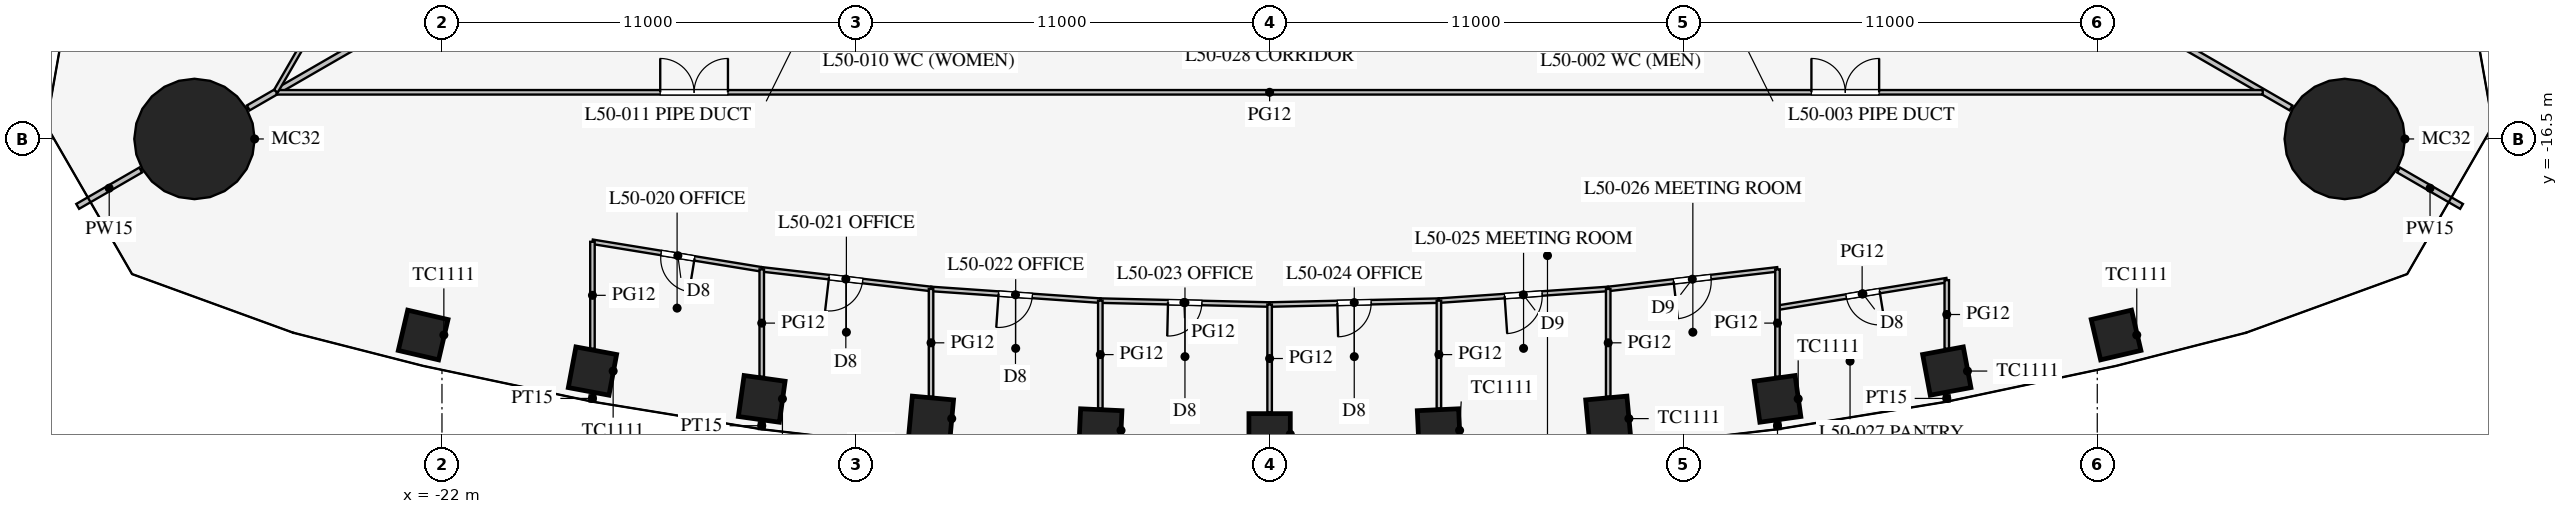
"""IFC4 building model, lengths in metres.
Left out: names, types, materials, properties, quantities, classifications, styles, units other than length and angle.
Written with IfcOpenShell. Run it as: python <this file> out.ifc"""

import sys

from ifc_helpers import new_model, si_unit, direction, frame, frame_2d, origin, origin_2d, place, context, subcontext, project, spatial, rectangle, circle, extrude, element, fill, save


model = new_model("IFC4")
c1 = context("Model", 3, precision=1e-05, world=origin(), true_north=direction((0.0, 1.0)))
c2 = subcontext(c1, "Body", "Model", "MODEL_VIEW")
j1 = project(units=[si_unit("LENGTHUNIT", "METRE"), si_unit("PLANEANGLEUNIT", "RADIAN")], contexts=[c1])
p1 = place(None, origin())
s1 = spatial("IfcSite", under=j1, at=p1, CompositionType="ELEMENT")
p2 = place(p1, origin())
s2 = spatial("IfcBuilding", under=s1, at=p2, CompositionType="ELEMENT")
p3 = place(p2, frame((0.0, 0.0, 219.1)))
s3 = spatial("IfcBuildingStorey", under=s2, at=p3, CompositionType="ELEMENT", Elevation=219.1)
for number, where, z_axis, x_axis in (
    (1, (-22.5, -21.71, 0.0), (0.0, 0.0, 1.0), (0.974, -0.227, 0.0)),
    (2, (-18.0, -22.669, 0.0), (0.0, 0.0, 1.0), (0.983, -0.184, 0.0)),
    (3, (-13.5, -23.408, 0.0), (0.0, 0.0, 1.0), (0.99, -0.138, 0.0)),
    (4, (-9.0, -23.933, 0.0), (0.0, 0.0, 1.0), (0.996, -0.092, 0.0)),
    (5, (-4.5, -24.246, 0.0), (0.0, 0.0, 1.0), (0.999, -0.046, 0.0)),
    (6, (0.0, -24.351, 0.0), (0.0, 0.0, 1.0), (1.0, 0.0, 0.0)),
    (7, (4.5, -24.246, 0.0), (0.0, 0.0, 1.0), (0.999, 0.046, 0.0)),
    (8, (9.0, -23.933, 0.0), (0.0, 0.0, 1.0), (0.996, 0.092, 0.0)),
    (9, (13.5, -23.408, 0.0), (0.0, 0.0, 1.0), (0.99, 0.138, 0.0)),
    (10, (18.0, -22.669, 0.0), (0.0, 0.0, 1.0), (0.983, 0.184, 0.0)),
    (11, (22.5, -21.71, 0.0), (0.0, 0.0, 1.0), (0.974, 0.227, 0.0)),
):
    element("IfcColumn", number, at=place(p3, frame(where, z_axis=z_axis, x_axis=x_axis)), inside=s3, PredefinedType="COLUMN", context=c2, shape_type="SweptSolid", body=[
        extrude(rectangle(XDim=1.1, YDim=1.1, at=origin_2d()), origin(), (0.0, 0.0, 1.0), 4.2),
    ])
for number, where, z_axis, x_axis in (
    (12, (28.579, -16.5, 0.0), (0.0, 0.0, 1.0), (1.0, 0.0, 0.0)),
    (13, (-28.579, -16.5, 0.0), (0.0, 0.0, 1.0), (1.0, 0.0, 0.0)),
):
    element("IfcColumn", number, at=place(p3, frame(where, z_axis=z_axis, x_axis=x_axis)), inside=s3, PredefinedType="COLUMN", context=c2, shape_type="SweptSolid", body=[
        extrude(circle(Radius=1.6, at=origin_2d()), origin(), (0.0, 0.0, 1.0), 4.2),
    ])
p4 = place(p3, frame((14.203, -8.2, 0.0), z_axis=(0.0, 0.0, 1.0), x_axis=(0.866021600284, -0.500006587798, 0.0)))
e14 = element("IfcWall", 14, at=p4, inside=s3, PredefinedType="PARTITIONING", context=c2, shape_type="SweptSolid", body=[
    extrude(rectangle(XDim=14.95, YDim=0.15, at=frame_2d((7.475, 0.0))), origin(), (0.0, 0.0, 1.0), 2.4),
])
p5 = place(p3, frame((30.008, -17.325, 0.0), z_axis=(0.0, 0.0, 1.0), x_axis=(0.866013246922, -0.500021055713, 0.0)))
e15 = element("IfcWall", 15, at=p5, inside=s3, PredefinedType="PARTITIONING", context=c2, shape_type="SweptSolid", body=[
    extrude(rectangle(XDim=1.935, YDim=0.15, at=frame_2d((0.967, 0.0))), origin(), (0.0, 0.0, 1.0), 2.4),
])
p6 = place(p3, frame((-14.203, -8.2, 0.0), z_axis=(0.0, 0.0, 1.0), x_axis=(-0.866021600284, -0.500006587798, 0.0)))
e16 = element("IfcWall", 16, at=p6, inside=s3, PredefinedType="PARTITIONING", context=c2, shape_type="SweptSolid", body=[
    extrude(rectangle(XDim=14.95, YDim=0.15, at=frame_2d((7.475, 0.0))), origin(), (0.0, 0.0, 1.0), 2.4),
])
p7 = place(p3, frame((-30.008, -17.325, 0.0), z_axis=(0.0, 0.0, 1.0), x_axis=(-0.866013246922, -0.500021055713, 0.0)))
e17 = element("IfcWall", 17, at=p7, inside=s3, PredefinedType="PARTITIONING", context=c2, shape_type="SweptSolid", body=[
    extrude(rectangle(XDim=1.935, YDim=0.15, at=frame_2d((0.967, 0.0))), origin(), (0.0, 0.0, 1.0), 2.4),
])
p8 = place(p3, frame((-26.398, -15.26, 0.0), z_axis=(0.0, 0.0, 1.0), x_axis=(1.0, 0.0, 0.0)))
e18 = element("IfcWall", 18, at=p8, inside=s3, PredefinedType="PARTITIONING", context=c2, shape_type="SweptSolid", body=[
    extrude(rectangle(XDim=52.796, YDim=0.12, at=frame_2d((26.398, 0.0))), origin(), (0.0, 0.0, 1.0), 2.9),
])
p9 = place(p8, frame((10.2, 0.0, 0.15)))
e19 = element("IfcOpeningElement", 19, at=p9, cuts=e18, PredefinedType="OPENING", context=c2, shape_type="SweptSolid", body=[
    extrude(rectangle(XDim=1.8, YDim=2.1, at=frame_2d((0.9, 1.05))), frame((0.0, 0.07, 0.0), z_axis=(0.0, -1.0, 0.0), x_axis=(1.0, 0.0, 0.0)), (0.0, 0.0, 1.0), 0.14),
])
p10 = place(p8, frame((40.8, 0.0, 0.15)))
e20 = element("IfcOpeningElement", 20, at=p10, cuts=e18, PredefinedType="OPENING", context=c2, shape_type="SweptSolid", body=[
    extrude(rectangle(XDim=1.8, YDim=2.1, at=frame_2d((0.9, 1.05))), frame((0.0, 0.07, 0.0), z_axis=(0.0, -1.0, 0.0), x_axis=(1.0, 0.0, 0.0)), (0.0, 0.0, 1.0), 0.14),
])
p11 = place(p3, frame((13.5, -24.033, 0.0), z_axis=(0.0, 0.0, 1.0), x_axis=(0.0, -1.0, 0.0)))
e21 = element("IfcWall", 21, at=p11, inside=s3, PredefinedType="PARTITIONING", context=c2, shape_type="SweptSolid", body=[
    extrude(rectangle(XDim=0.178, YDim=0.15, at=frame_2d((0.089, 0.0))), origin(), (0.0, 0.0, 1.0), 2.9),
])
p12 = place(p3, frame((18.0, -23.315, 0.0), z_axis=(0.0, 0.0, 1.0), x_axis=(0.0, -1.0, 0.0)))
e22 = element("IfcWall", 22, at=p12, inside=s3, PredefinedType="PARTITIONING", context=c2, shape_type="SweptSolid", body=[
    extrude(rectangle(XDim=0.163, YDim=0.15, at=frame_2d((0.082, 0.0))), origin(), (0.0, 0.0, 1.0), 2.9),
])
p13 = place(p3, frame((-13.5, -24.033, 0.0), z_axis=(0.0, 0.0, 1.0), x_axis=(0.0, -1.0, 0.0)))
e23 = element("IfcWall", 23, at=p13, inside=s3, PredefinedType="PARTITIONING", context=c2, shape_type="SweptSolid", body=[
    extrude(rectangle(XDim=0.178, YDim=0.15, at=frame_2d((0.089, 0.0))), origin(), (0.0, 0.0, 1.0), 2.9),
])
p14 = place(p3, frame((-18.0, -23.315, 0.0), z_axis=(0.0, 0.0, 1.0), x_axis=(0.0, -1.0, 0.0)))
e24 = element("IfcWall", 24, at=p14, inside=s3, PredefinedType="PARTITIONING", context=c2, shape_type="SweptSolid", body=[
    extrude(rectangle(XDim=0.163, YDim=0.15, at=frame_2d((0.082, 0.0))), origin(), (0.0, 0.0, 1.0), 2.9),
])
p15 = place(p3, frame((0.0, -20.901, 0.0), z_axis=(0.0, 0.0, 1.0), x_axis=(0.99973552509, 0.022997388381, 0.0)))
e25 = element("IfcWall", 25, at=p15, inside=s3, PredefinedType="PARTITIONING", context=c2, shape_type="SweptSolid", body=[
    extrude(rectangle(XDim=4.501, YDim=0.12, at=frame_2d((2.25, 0.0))), origin(), (0.0, 0.0, 1.0), 2.9),
])
p16 = place(p15, frame((1.8, 0.0, 0.15)))
e26 = element("IfcOpeningElement", 26, at=p16, cuts=e25, PredefinedType="OPENING", context=c2, shape_type="SweptSolid", body=[
    extrude(rectangle(XDim=0.9, YDim=2.1, at=frame_2d((0.45, 1.05))), frame((0.0, 0.07, 0.0), z_axis=(0.0, -1.0, 0.0), x_axis=(1.0, 0.0, 0.0)), (0.0, 0.0, 1.0), 0.14),
])
p17 = place(p3, frame((13.5, -20.986, 0.0), z_axis=(0.0, 0.0, 1.0), x_axis=(0.986986525477, 0.160802980469, 0.0)))
e27 = element("IfcWall", 27, at=p17, inside=s3, PredefinedType="PARTITIONING", context=c2, shape_type="SweptSolid", body=[
    extrude(rectangle(XDim=4.559, YDim=0.12, at=frame_2d((2.28, 0.0))), origin(), (0.0, 0.0, 1.0), 2.9),
])
p18 = place(p17, frame((1.85, 0.0, 0.15)))
e28 = element("IfcOpeningElement", 28, at=p18, cuts=e27, PredefinedType="OPENING", context=c2, shape_type="SweptSolid", body=[
    extrude(rectangle(XDim=0.9, YDim=2.1, at=frame_2d((0.45, 1.05))), frame((0.0, 0.07, 0.0), z_axis=(0.0, -1.0, 0.0), x_axis=(1.0, 0.0, 0.0)), (0.0, 0.0, 1.0), 0.14),
])
p19 = place(p3, frame((4.5, -20.797, 0.0), z_axis=(0.0, 0.0, 1.0), x_axis=(0.997623533978, 0.068900540297, 0.0)))
e29 = element("IfcWall", 29, at=p19, inside=s3, PredefinedType="PARTITIONING", context=c2, shape_type="SweptSolid", body=[
    extrude(rectangle(XDim=4.511, YDim=0.12, at=frame_2d((2.255, 0.0))), origin(), (0.0, 0.0, 1.0), 2.9),
])
p20 = place(p19, frame((1.75, 0.0, 0.15)))
e30 = element("IfcOpeningElement", 30, at=p20, cuts=e29, PredefinedType="OPENING", context=c2, shape_type="SweptSolid", body=[
    extrude(rectangle(XDim=1.0, YDim=2.1, at=frame_2d((0.5, 1.05))), frame((0.0, 0.07, 0.0), z_axis=(0.0, -1.0, 0.0), x_axis=(1.0, 0.0, 0.0)), (0.0, 0.0, 1.0), 0.14),
])
p21 = place(p3, frame((9.0, -20.486, 0.0), z_axis=(0.0, 0.0, 1.0), x_axis=(0.993382946625, 0.114849124309, 0.0)))
e31 = element("IfcWall", 31, at=p21, inside=s3, PredefinedType="PARTITIONING", context=c2, shape_type="SweptSolid", body=[
    extrude(rectangle(XDim=4.53, YDim=0.12, at=frame_2d((2.265, 0.0))), origin(), (0.0, 0.0, 1.0), 2.9),
])
p22 = place(p21, frame((1.75, 0.0, 0.15)))
e32 = element("IfcOpeningElement", 32, at=p22, cuts=e31, PredefinedType="OPENING", context=c2, shape_type="SweptSolid", body=[
    extrude(rectangle(XDim=1.0, YDim=2.1, at=frame_2d((0.5, 1.05))), frame((0.0, 0.07, 0.0), z_axis=(0.0, -1.0, 0.0), x_axis=(1.0, 0.0, 0.0)), (0.0, 0.0, 1.0), 0.14),
])
p23 = place(p3, frame((-13.5, -19.966, 0.0), z_axis=(0.0, 0.0, 1.0), x_axis=(0.993382946625, -0.114849124309, 0.0)))
e33 = element("IfcWall", 33, at=p23, inside=s3, PredefinedType="PARTITIONING", context=c2, shape_type="SweptSolid", body=[
    extrude(rectangle(XDim=4.53, YDim=0.12, at=frame_2d((2.265, 0.0))), origin(), (0.0, 0.0, 1.0), 2.9),
])
p24 = place(p23, frame((1.8, 0.0, 0.15)))
e34 = element("IfcOpeningElement", 34, at=p24, cuts=e33, PredefinedType="OPENING", context=c2, shape_type="SweptSolid", body=[
    extrude(rectangle(XDim=0.9, YDim=2.1, at=frame_2d((0.45, 1.05))), frame((0.0, 0.07, 0.0), z_axis=(0.0, -1.0, 0.0), x_axis=(1.0, 0.0, 0.0)), (0.0, 0.0, 1.0), 0.14),
])
p25 = place(p3, frame((-18.0, -19.233, 0.0), z_axis=(0.0, 0.0, 1.0), x_axis=(0.986986525477, -0.160802980469, 0.0)))
e35 = element("IfcWall", 35, at=p25, inside=s3, PredefinedType="PARTITIONING", context=c2, shape_type="SweptSolid", body=[
    extrude(rectangle(XDim=4.559, YDim=0.12, at=frame_2d((2.28, 0.0))), origin(), (0.0, 0.0, 1.0), 2.9),
])
p26 = place(p25, frame((1.85, 0.0, 0.15)))
e36 = element("IfcOpeningElement", 36, at=p26, cuts=e35, PredefinedType="OPENING", context=c2, shape_type="SweptSolid", body=[
    extrude(rectangle(XDim=0.9, YDim=2.1, at=frame_2d((0.45, 1.05))), frame((0.0, 0.07, 0.0), z_axis=(0.0, -1.0, 0.0), x_axis=(1.0, 0.0, 0.0)), (0.0, 0.0, 1.0), 0.14),
])
p27 = place(p3, frame((-4.5, -20.797, 0.0), z_axis=(0.0, 0.0, 1.0), x_axis=(0.99973552509, -0.022997388381, 0.0)))
e37 = element("IfcWall", 37, at=p27, inside=s3, PredefinedType="PARTITIONING", context=c2, shape_type="SweptSolid", body=[
    extrude(rectangle(XDim=4.501, YDim=0.12, at=frame_2d((2.25, 0.0))), origin(), (0.0, 0.0, 1.0), 2.9),
])
p28 = place(p27, frame((1.8, 0.0, 0.15)))
e38 = element("IfcOpeningElement", 38, at=p28, cuts=e37, PredefinedType="OPENING", context=c2, shape_type="SweptSolid", body=[
    extrude(rectangle(XDim=0.9, YDim=2.1, at=frame_2d((0.45, 1.05))), frame((0.0, 0.07, 0.0), z_axis=(0.0, -1.0, 0.0), x_axis=(1.0, 0.0, 0.0)), (0.0, 0.0, 1.0), 0.14),
])
p29 = place(p3, frame((-9.0, -20.486, 0.0), z_axis=(0.0, 0.0, 1.0), x_axis=(0.997623533978, -0.068900540297, 0.0)))
e39 = element("IfcWall", 39, at=p29, inside=s3, PredefinedType="PARTITIONING", context=c2, shape_type="SweptSolid", body=[
    extrude(rectangle(XDim=4.511, YDim=0.12, at=frame_2d((2.255, 0.0))), origin(), (0.0, 0.0, 1.0), 2.9),
])
p30 = place(p29, frame((1.8, 0.0, 0.15)))
e40 = element("IfcOpeningElement", 40, at=p30, cuts=e39, PredefinedType="OPENING", context=c2, shape_type="SweptSolid", body=[
    extrude(rectangle(XDim=0.9, YDim=2.1, at=frame_2d((0.45, 1.05))), frame((0.0, 0.07, 0.0), z_axis=(0.0, -1.0, 0.0), x_axis=(1.0, 0.0, 0.0)), (0.0, 0.0, 1.0), 0.14),
])
p31 = place(p3, frame((0.0, -20.901, 0.0), z_axis=(0.0, 0.0, 1.0), x_axis=(0.0, -1.0, 0.0)))
e41 = element("IfcWall", 41, at=p31, inside=s3, PredefinedType="PARTITIONING", context=c2, shape_type="SweptSolid", body=[
    extrude(rectangle(XDim=2.87, YDim=0.12, at=frame_2d((1.435, 0.0))), origin(), (0.0, 0.0, 1.0), 2.9),
])
p32 = place(p3, frame((13.5, -19.966, 0.0), z_axis=(0.0, 0.0, 1.0), x_axis=(0.0, -1.0, 0.0)))
e42 = element("IfcWall", 42, at=p32, inside=s3, PredefinedType="PARTITIONING", context=c2, shape_type="SweptSolid", body=[
    extrude(rectangle(XDim=2.857, YDim=0.12, at=frame_2d((1.428, 0.0))), origin(), (0.0, 0.0, 1.0), 2.9),
])
p33 = place(p3, frame((18.0, -20.253, 0.0), z_axis=(0.0, 0.0, 1.0), x_axis=(0.0, -1.0, 0.0)))
e43 = element("IfcWall", 43, at=p33, inside=s3, PredefinedType="PARTITIONING", context=c2, shape_type="SweptSolid", body=[
    extrude(rectangle(XDim=1.826, YDim=0.12, at=frame_2d((0.913, 0.0))), origin(), (0.0, 0.0, 1.0), 2.9),
])
p34 = place(p3, frame((4.5, -20.797, 0.0), z_axis=(0.0, 0.0, 1.0), x_axis=(0.0, -1.0, 0.0)))
e44 = element("IfcWall", 44, at=p34, inside=s3, PredefinedType="PARTITIONING", context=c2, shape_type="SweptSolid", body=[
    extrude(rectangle(XDim=2.869, YDim=0.12, at=frame_2d((1.434, 0.0))), origin(), (0.0, 0.0, 1.0), 2.9),
])
p35 = place(p3, frame((9.0, -20.486, 0.0), z_axis=(0.0, 0.0, 1.0), x_axis=(0.0, -1.0, 0.0)))
e45 = element("IfcWall", 45, at=p35, inside=s3, PredefinedType="PARTITIONING", context=c2, shape_type="SweptSolid", body=[
    extrude(rectangle(XDim=2.864, YDim=0.12, at=frame_2d((1.432, 0.0))), origin(), (0.0, 0.0, 1.0), 2.9),
])
p36 = place(p3, frame((-13.5, -19.966, 0.0), z_axis=(0.0, 0.0, 1.0), x_axis=(0.0, -1.0, 0.0)))
e46 = element("IfcWall", 46, at=p36, inside=s3, PredefinedType="PARTITIONING", context=c2, shape_type="SweptSolid", body=[
    extrude(rectangle(XDim=2.857, YDim=0.12, at=frame_2d((1.428, 0.0))), origin(), (0.0, 0.0, 1.0), 2.9),
])
p37 = place(p3, frame((-18.0, -19.233, 0.0), z_axis=(0.0, 0.0, 1.0), x_axis=(0.0, -1.0, 0.0)))
e47 = element("IfcWall", 47, at=p37, inside=s3, PredefinedType="PARTITIONING", context=c2, shape_type="SweptSolid", body=[
    extrude(rectangle(XDim=2.846, YDim=0.12, at=frame_2d((1.423, 0.0))), origin(), (0.0, 0.0, 1.0), 2.9),
])
p38 = place(p3, frame((-4.5, -20.797, 0.0), z_axis=(0.0, 0.0, 1.0), x_axis=(0.0, -1.0, 0.0)))
e48 = element("IfcWall", 48, at=p38, inside=s3, PredefinedType="PARTITIONING", context=c2, shape_type="SweptSolid", body=[
    extrude(rectangle(XDim=2.869, YDim=0.12, at=frame_2d((1.434, 0.0))), origin(), (0.0, 0.0, 1.0), 2.9),
])
p39 = place(p3, frame((-9.0, -20.486, 0.0), z_axis=(0.0, 0.0, 1.0), x_axis=(0.0, -1.0, 0.0)))
e49 = element("IfcWall", 49, at=p39, inside=s3, PredefinedType="PARTITIONING", context=c2, shape_type="SweptSolid", body=[
    extrude(rectangle(XDim=2.864, YDim=0.12, at=frame_2d((1.432, 0.0))), origin(), (0.0, 0.0, 1.0), 2.9),
])
p40 = place(p3, frame((-0.016, 30.491, 0.0), z_axis=(0.0, 0.0, 1.0), x_axis=(-0.50000091641, -0.866024874695, 0.0)))
e50 = element("IfcWall", 50, at=p40, inside=s3, PredefinedType="PARTITIONING", context=c2, shape_type="SweptSolid", body=[
    extrude(rectangle(XDim=52.796, YDim=0.12, at=frame_2d((26.398, 0.0))), origin(), (0.0, 0.0, 1.0), 2.9),
])
p41 = place(p40, frame((10.2, 0.0, 0.15)))
e51 = element("IfcOpeningElement", 51, at=p41, cuts=e50, PredefinedType="OPENING", context=c2, shape_type="SweptSolid", body=[
    extrude(rectangle(XDim=1.8, YDim=2.1, at=frame_2d((0.9, 1.05))), frame((0.0, 0.07, 0.0), z_axis=(0.0, -1.0, 0.0), x_axis=(1.0, 0.0, 0.0)), (0.0, 0.0, 1.0), 0.14),
])
p42 = place(p40, frame((40.8, 0.0, 0.15)))
e52 = element("IfcOpeningElement", 52, at=p42, cuts=e50, PredefinedType="OPENING", context=c2, shape_type="SweptSolid", body=[
    extrude(rectangle(XDim=1.8, YDim=2.1, at=frame_2d((0.9, 1.05))), frame((0.0, 0.07, 0.0), z_axis=(0.0, -1.0, 0.0), x_axis=(1.0, 0.0, 0.0)), (0.0, 0.0, 1.0), 0.14),
])
p43 = place(p26, frame((0.9, 0.0, 0.0), z_axis=(0.0, 0.0, 1.0), x_axis=(-1.0, 0.0, 0.0)))
e53 = element("IfcDoor", 53, at=p43, inside=s3, OperationType="SINGLE_SWING_LEFT", PredefinedType="DOOR", context=c2, shape_type="SweptSolid", body=[
    extrude(rectangle(XDim=0.9, YDim=2.1, at=frame_2d((0.45, 1.05))), frame((0.0, 0.025, 0.0), z_axis=(0.0, -1.0, 0.0), x_axis=(1.0, 0.0, 0.0)), (0.0, 0.0, 1.0), 0.05),
])
fill(e36, e53)
p44 = place(p24, frame((0.9, 0.0, 0.0), z_axis=(0.0, 0.0, 1.0), x_axis=(-1.0, 0.0, 0.0)))
e54 = element("IfcDoor", 54, at=p44, inside=s3, OperationType="SINGLE_SWING_RIGHT", PredefinedType="DOOR", context=c2, shape_type="SweptSolid", body=[
    extrude(rectangle(XDim=0.9, YDim=2.1, at=frame_2d((0.45, 1.05))), frame((0.0, 0.025, 0.0), z_axis=(0.0, -1.0, 0.0), x_axis=(1.0, 0.0, 0.0)), (0.0, 0.0, 1.0), 0.05),
])
fill(e34, e54)
p45 = place(p30, frame((0.9, 0.0, 0.0), z_axis=(0.0, 0.0, 1.0), x_axis=(-1.0, 0.0, 0.0)))
e55 = element("IfcDoor", 55, at=p45, inside=s3, OperationType="SINGLE_SWING_RIGHT", PredefinedType="DOOR", context=c2, shape_type="SweptSolid", body=[
    extrude(rectangle(XDim=0.9, YDim=2.1, at=frame_2d((0.45, 1.05))), frame((0.0, 0.025, 0.0), z_axis=(0.0, -1.0, 0.0), x_axis=(1.0, 0.0, 0.0)), (0.0, 0.0, 1.0), 0.05),
])
fill(e40, e55)
p46 = place(p28, frame((0.9, 0.0, 0.0), z_axis=(0.0, 0.0, 1.0), x_axis=(-1.0, 0.0, 0.0)))
e56 = element("IfcDoor", 56, at=p46, inside=s3, OperationType="SINGLE_SWING_RIGHT", PredefinedType="DOOR", context=c2, shape_type="SweptSolid", body=[
    extrude(rectangle(XDim=0.9, YDim=2.1, at=frame_2d((0.45, 1.05))), frame((0.0, 0.025, 0.0), z_axis=(0.0, -1.0, 0.0), x_axis=(1.0, 0.0, 0.0)), (0.0, 0.0, 1.0), 0.05),
])
fill(e38, e56)
p47 = place(p16, frame((0.9, 0.0, 0.0), z_axis=(0.0, 0.0, 1.0), x_axis=(-1.0, 0.0, 0.0)))
e57 = element("IfcDoor", 57, at=p47, inside=s3, OperationType="SINGLE_SWING_RIGHT", PredefinedType="DOOR", context=c2, shape_type="SweptSolid", body=[
    extrude(rectangle(XDim=0.9, YDim=2.1, at=frame_2d((0.45, 1.05))), frame((0.0, 0.025, 0.0), z_axis=(0.0, -1.0, 0.0), x_axis=(1.0, 0.0, 0.0)), (0.0, 0.0, 1.0), 0.05),
])
fill(e26, e57)
p48 = place(p20, frame((1.0, 0.0, 0.0), z_axis=(0.0, 0.0, 1.0), x_axis=(-1.0, 0.0, 0.0)))
e58 = element("IfcDoor", 58, at=p48, inside=s3, OperationType="SINGLE_SWING_RIGHT", PredefinedType="DOOR", context=c2, shape_type="SweptSolid", body=[
    extrude(rectangle(XDim=1.0, YDim=2.1, at=frame_2d((0.5, 1.05))), frame((0.0, 0.025, 0.0), z_axis=(0.0, -1.0, 0.0), x_axis=(1.0, 0.0, 0.0)), (0.0, 0.0, 1.0), 0.05),
])
fill(e30, e58)
p49 = place(p22, frame((1.0, 0.0, 0.0), z_axis=(0.0, 0.0, 1.0), x_axis=(-1.0, 0.0, 0.0)))
e59 = element("IfcDoor", 59, at=p49, inside=s3, OperationType="SINGLE_SWING_RIGHT", PredefinedType="DOOR", context=c2, shape_type="SweptSolid", body=[
    extrude(rectangle(XDim=1.0, YDim=2.1, at=frame_2d((0.5, 1.05))), frame((0.0, 0.025, 0.0), z_axis=(0.0, -1.0, 0.0), x_axis=(1.0, 0.0, 0.0)), (0.0, 0.0, 1.0), 0.05),
])
fill(e32, e59)
p50 = place(p18, frame((0.9, 0.0, 0.0), z_axis=(0.0, 0.0, 1.0), x_axis=(-1.0, 0.0, 0.0)))
e60 = element("IfcDoor", 60, at=p50, inside=s3, OperationType="SINGLE_SWING_LEFT", PredefinedType="DOOR", context=c2, shape_type="SweptSolid", body=[
    extrude(rectangle(XDim=0.9, YDim=2.1, at=frame_2d((0.45, 1.05))), frame((0.0, 0.025, 0.0), z_axis=(0.0, -1.0, 0.0), x_axis=(1.0, 0.0, 0.0)), (0.0, 0.0, 1.0), 0.05),
])
fill(e28, e60)
p51 = place(p9, origin())
e61 = element("IfcDoor", 61, at=p51, inside=s3, OperationType="DOUBLE_DOOR_SINGLE_SWING", PredefinedType="DOOR", context=c2, shape_type="SweptSolid", body=[
    extrude(rectangle(XDim=1.8, YDim=2.1, at=frame_2d((0.9, 1.05))), frame((0.0, 0.025, 0.0), z_axis=(0.0, -1.0, 0.0), x_axis=(1.0, 0.0, 0.0)), (0.0, 0.0, 1.0), 0.05),
])
fill(e19, e61)
p52 = place(p10, origin())
e62 = element("IfcDoor", 62, at=p52, inside=s3, OperationType="DOUBLE_DOOR_SINGLE_SWING", PredefinedType="DOOR", context=c2, shape_type="SweptSolid", body=[
    extrude(rectangle(XDim=1.8, YDim=2.1, at=frame_2d((0.9, 1.05))), frame((0.0, 0.025, 0.0), z_axis=(0.0, -1.0, 0.0), x_axis=(1.0, 0.0, 0.0)), (0.0, 0.0, 1.0), 0.05),
])
fill(e20, e62)
save(model, sys.argv[1])
